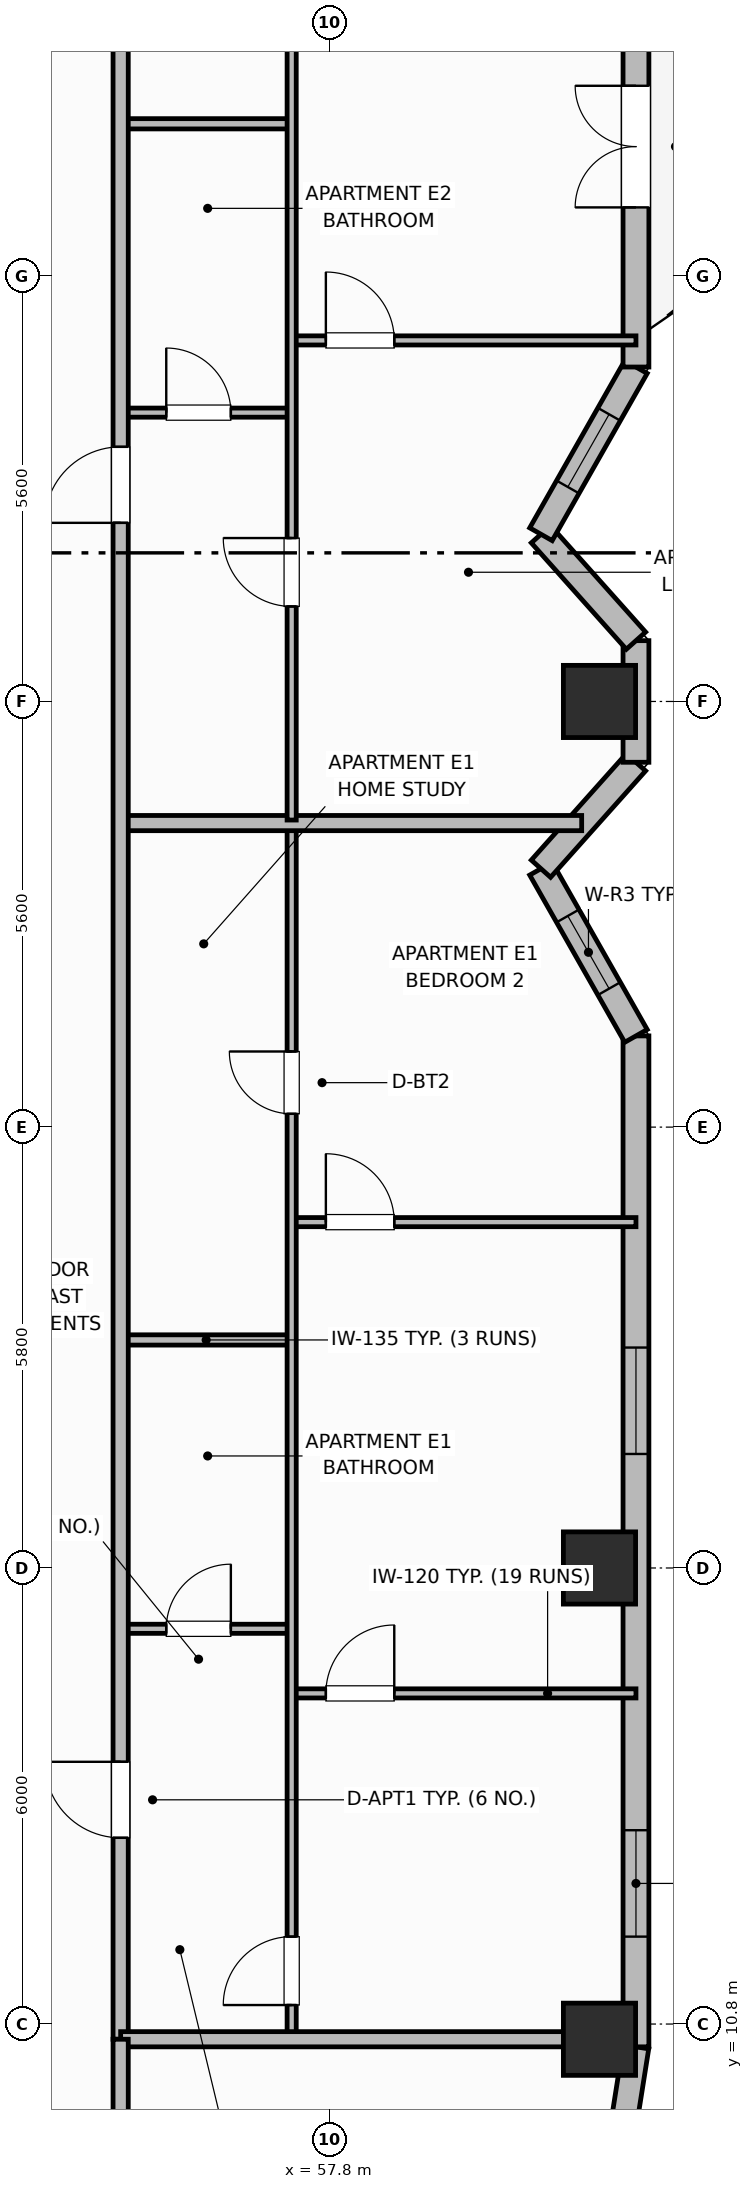
"""IFC4 building model, lengths in metres.
Left out: names, types, materials, properties, quantities, classifications, styles, units other than length and angle.
Written with IfcOpenShell. Run it as: python <this file> out.ifc"""

import sys

from ifc_helpers import new_model, si_unit, direction, frame, frame_2d, origin, origin_2d, place, context, subcontext, project, spatial, rectangle, extrude, element, fill, save


model = new_model("IFC4")
c1 = context("Model", 3, precision=1e-05, world=origin(), true_north=direction((0.0, 1.0)))
c2 = subcontext(c1, "Body", "Model", "MODEL_VIEW")
j1 = project(units=[si_unit("LENGTHUNIT", "METRE"), si_unit("PLANEANGLEUNIT", "RADIAN")], contexts=[c1])
p1 = place(None, origin())
s1 = spatial("IfcSite", under=j1, at=p1, CompositionType="ELEMENT")
p2 = place(p1, origin())
s2 = spatial("IfcBuilding", under=s1, at=p2, CompositionType="ELEMENT")
p3 = place(p2, frame((0.0, 0.0, 166.3)))
s3 = spatial("IfcBuildingStorey", under=s2, at=p3, CompositionType="ELEMENT", Elevation=166.3)
for number, where, z_axis, x_axis in (
    (1, (61.35, 10.6, 0.0), (0.0, 0.0, 1.0), (1.0, 0.0, 0.0)),
    (2, (61.35, 16.8, 0.0), (0.0, 0.0, 1.0), (1.0, 0.0, 0.0)),
    (3, (61.35, 28.2, 0.0), (0.0, 0.0, 1.0), (1.0, 0.0, 0.0)),
):
    element("IfcColumn", number, at=place(p3, frame(where, z_axis=z_axis, x_axis=x_axis)), inside=s3, PredefinedType="COLUMN", context=c2, shape_type="SweptSolid", body=[
        extrude(rectangle(XDim=0.95, YDim=0.95, at=origin_2d()), origin(), (0.0, 0.0, 1.0), 3.7),
    ])
p4 = place(p3, frame((61.652, 9.378, 0.0), z_axis=(0.0, 0.0, 1.0), x_axis=(0.156514556949, 0.987675651954, 0.0)))
e4 = element("IfcWall", 4, at=p4, inside=s3, PredefinedType="SOLIDWALL", context=c2, shape_type="SweptSolid", body=[
    extrude(rectangle(XDim=1.135, YDim=0.34, at=frame_2d((0.568, 0.0))), origin(), (0.0, 0.0, 1.0), 2.72),
])
p5 = place(p3, frame((61.83, 10.5, 0.0), z_axis=(0.0, 0.0, 1.0), x_axis=(0.0, 1.0, 0.0)))
e5 = element("IfcWall", 5, at=p5, inside=s3, PredefinedType="SOLIDWALL", context=c2, shape_type="SweptSolid", body=[
    extrude(rectangle(XDim=13.3, YDim=0.34, at=frame_2d((6.65, 0.0))), origin(), (0.0, 0.0, 1.0), 2.72),
])
p6 = place(p5, frame((1.45, 0.0, 0.75)))
e6 = element("IfcOpeningElement", 6, at=p6, cuts=e5, PredefinedType="OPENING", context=c2, shape_type="SweptSolid", body=[
    extrude(rectangle(XDim=1.4, YDim=1.85, at=frame_2d((0.7, 0.925))), frame((0.0, 0.18, 0.0), z_axis=(0.0, -1.0, 0.0), x_axis=(1.0, 0.0, 0.0)), (0.0, 0.0, 1.0), 0.36),
])
p7 = place(p5, frame((7.8, 0.0, 0.75)))
e7 = element("IfcOpeningElement", 7, at=p7, cuts=e5, PredefinedType="OPENING", context=c2, shape_type="SweptSolid", body=[
    extrude(rectangle(XDim=1.4, YDim=1.85, at=frame_2d((0.7, 0.925))), frame((0.0, 0.18, 0.0), z_axis=(0.0, -1.0, 0.0), x_axis=(1.0, 0.0, 0.0)), (0.0, 0.0, 1.0), 0.36),
])
p8 = place(p3, frame((61.83, 23.8, 0.0), z_axis=(0.0, 0.0, 1.0), x_axis=(-0.494017696272, 0.869451847873, 0.0)))
e8 = element("IfcWall", 8, at=p8, inside=s3, PredefinedType="SOLIDWALL", context=c2, shape_type="SweptSolid", body=[
    extrude(rectangle(XDim=2.53, YDim=0.34, at=frame_2d((1.265, 0.0))), origin(), (0.0, 0.0, 1.0), 2.72),
])
p9 = place(p8, frame((0.715, 0.0, 0.91)))
e9 = element("IfcOpeningElement", 9, at=p9, cuts=e8, PredefinedType="OPENING", context=c2, shape_type="SweptSolid", body=[
    extrude(rectangle(XDim=1.1, YDim=1.65, at=frame_2d((0.55, 0.825))), frame((0.0, 0.18, 0.0), z_axis=(0.0, -1.0, 0.0), x_axis=(1.0, 0.0, 0.0)), (0.0, 0.0, 1.0), 0.36),
])
p10 = place(p3, frame((60.58, 26.0, 0.0), z_axis=(0.0, 0.0, 1.0), x_axis=(0.666041619974, 0.74591457987, 0.0)))
e10 = element("IfcWall", 10, at=p10, inside=s3, PredefinedType="SOLIDWALL", context=c2, shape_type="SweptSolid", body=[
    extrude(rectangle(XDim=1.877, YDim=0.34, at=frame_2d((0.938, 0.0))), origin(), (0.0, 0.0, 1.0), 2.72),
])
p11 = place(p3, frame((61.83, 27.4, 0.0), z_axis=(0.0, 0.0, 1.0), x_axis=(0.0, 1.0, 0.0)))
e11 = element("IfcWall", 11, at=p11, inside=s3, PredefinedType="SOLIDWALL", context=c2, shape_type="SweptSolid", body=[
    extrude(rectangle(XDim=1.6, YDim=0.34, at=frame_2d((0.8, 0.0))), origin(), (0.0, 0.0, 1.0), 2.72),
])
p12 = place(p3, frame((61.83, 29.0, 0.0), z_axis=(0.0, 0.0, 1.0), x_axis=(-0.666041619974, 0.74591457987, 0.0)))
e12 = element("IfcWall", 12, at=p12, inside=s3, PredefinedType="SOLIDWALL", context=c2, shape_type="SweptSolid", body=[
    extrude(rectangle(XDim=1.877, YDim=0.34, at=frame_2d((0.938, 0.0))), origin(), (0.0, 0.0, 1.0), 2.72),
])
p13 = place(p3, frame((60.58, 30.4, 0.0), z_axis=(0.0, 0.0, 1.0), x_axis=(0.493976255291, 0.869475393101, 0.0)))
e13 = element("IfcWall", 13, at=p13, inside=s3, PredefinedType="SOLIDWALL", context=c2, shape_type="SweptSolid", body=[
    extrude(rectangle(XDim=2.531, YDim=0.34, at=frame_2d((1.265, 0.0))), origin(), (0.0, 0.0, 1.0), 2.72),
])
p14 = place(p13, frame((0.715, 0.0, 0.91)))
e14 = element("IfcOpeningElement", 14, at=p14, cuts=e13, PredefinedType="OPENING", context=c2, shape_type="SweptSolid", body=[
    extrude(rectangle(XDim=1.1, YDim=1.65, at=frame_2d((0.55, 0.825))), frame((0.0, 0.18, 0.0), z_axis=(0.0, -1.0, 0.0), x_axis=(1.0, 0.0, 0.0)), (0.0, 0.0, 1.0), 0.36),
])
p15 = place(p3, frame((61.83, 32.6, 0.0), z_axis=(0.0, 0.0, 1.0), x_axis=(0.0, 1.0, 0.0)))
e15 = element("IfcWall", 15, at=p15, inside=s3, PredefinedType="SOLIDWALL", context=c2, shape_type="SweptSolid", body=[
    extrude(rectangle(XDim=13.3, YDim=0.34, at=frame_2d((6.65, 0.0))), origin(), (0.0, 0.0, 1.0), 2.72),
])
p16 = place(p15, frame((2.1, 0.0, 0.0)))
e16 = element("IfcOpeningElement", 16, at=p16, cuts=e15, PredefinedType="OPENING", context=c2, shape_type="SweptSolid", body=[
    extrude(rectangle(XDim=1.6, YDim=2.1, at=frame_2d((0.8, 1.05))), frame((0.0, 0.18, 0.0), z_axis=(0.0, -1.0, 0.0), x_axis=(1.0, 0.0, 0.0)), (0.0, 0.0, 1.0), 0.36),
])
p17 = place(p15, frame((8.3, 0.0, 0.95)))
e17 = element("IfcOpeningElement", 17, at=p17, cuts=e15, PredefinedType="OPENING", context=c2, shape_type="SweptSolid", body=[
    extrude(rectangle(XDim=1.1, YDim=1.65, at=frame_2d((0.55, 0.825))), frame((0.0, 0.18, 0.0), z_axis=(0.0, -1.0, 0.0), x_axis=(1.0, 0.0, 0.0)), (0.0, 0.0, 1.0), 0.36),
])
p18 = place(p15, frame((10.6, 0.0, 0.95)))
e18 = element("IfcOpeningElement", 18, at=p18, cuts=e15, PredefinedType="OPENING", context=c2, shape_type="SweptSolid", body=[
    extrude(rectangle(XDim=1.1, YDim=1.65, at=frame_2d((0.55, 0.825))), frame((0.0, 0.18, 0.0), z_axis=(0.0, -1.0, 0.0), x_axis=(1.0, 0.0, 0.0)), (0.0, 0.0, 1.0), 0.36),
])
p19 = place(p3, frame((55.05, 16.0, 0.0), z_axis=(0.0, 0.0, 1.0), x_axis=(1.0, 0.0, 0.0)))
e19 = element("IfcWall", 19, at=p19, inside=s3, PredefinedType="PARTITIONING", context=c2, shape_type="SweptSolid", body=[
    extrude(rectangle(XDim=2.25, YDim=0.12, at=frame_2d((1.125, 0.0))), origin(), (0.0, 0.0, 1.0), 2.55),
])
p20 = place(p19, frame((0.6, 0.0, 0.0)))
e20 = element("IfcOpeningElement", 20, at=p20, cuts=e19, PredefinedType="OPENING", context=c2, shape_type="SweptSolid", body=[
    extrude(rectangle(XDim=0.85, YDim=2.1, at=frame_2d((0.425, 1.05))), frame((0.0, 0.07, 0.0), z_axis=(0.0, -1.0, 0.0), x_axis=(1.0, 0.0, 0.0)), (0.0, 0.0, 1.0), 0.14),
])
p21 = place(p3, frame((55.05, 19.8, 0.0), z_axis=(0.0, 0.0, 1.0), x_axis=(1.0, 0.0, 0.0)))
e21 = element("IfcWall", 21, at=p21, inside=s3, PredefinedType="PARTITIONING", context=c2, shape_type="SweptSolid", body=[
    extrude(rectangle(XDim=2.25, YDim=0.135, at=frame_2d((1.125, 0.0))), origin(), (0.0, 0.0, 1.0), 2.55),
])
p22 = place(p3, frame((57.3, 15.15, 0.0), z_axis=(0.0, 0.0, 1.0), x_axis=(1.0, 0.0, 0.0)))
e22 = element("IfcWall", 22, at=p22, inside=s3, PredefinedType="PARTITIONING", context=c2, shape_type="SweptSolid", body=[
    extrude(rectangle(XDim=4.53, YDim=0.12, at=frame_2d((2.265, 0.0))), origin(), (0.0, 0.0, 1.0), 2.55),
])
p23 = place(p22, frame((0.45, 0.0, 0.0)))
e23 = element("IfcOpeningElement", 23, at=p23, cuts=e22, PredefinedType="OPENING", context=c2, shape_type="SweptSolid", body=[
    extrude(rectangle(XDim=0.9, YDim=2.1, at=frame_2d((0.45, 1.05))), frame((0.0, 0.07, 0.0), z_axis=(0.0, -1.0, 0.0), x_axis=(1.0, 0.0, 0.0)), (0.0, 0.0, 1.0), 0.14),
])
p24 = place(p3, frame((57.3, 21.35, 0.0), z_axis=(0.0, 0.0, 1.0), x_axis=(1.0, 0.0, 0.0)))
e24 = element("IfcWall", 24, at=p24, inside=s3, PredefinedType="PARTITIONING", context=c2, shape_type="SweptSolid", body=[
    extrude(rectangle(XDim=4.53, YDim=0.12, at=frame_2d((2.265, 0.0))), origin(), (0.0, 0.0, 1.0), 2.55),
])
p25 = place(p24, frame((0.45, 0.0, 0.0)))
e25 = element("IfcOpeningElement", 25, at=p25, cuts=e24, PredefinedType="OPENING", context=c2, shape_type="SweptSolid", body=[
    extrude(rectangle(XDim=0.9, YDim=2.1, at=frame_2d((0.45, 1.05))), frame((0.0, 0.07, 0.0), z_axis=(0.0, -1.0, 0.0), x_axis=(1.0, 0.0, 0.0)), (0.0, 0.0, 1.0), 0.14),
])
p26 = place(p3, frame((57.3, 10.64, 0.0), z_axis=(0.0, 0.0, 1.0), x_axis=(0.0, 1.0, 0.0)))
e26 = element("IfcWall", 26, at=p26, inside=s3, PredefinedType="PARTITIONING", context=c2, shape_type="SweptSolid", body=[
    extrude(rectangle(XDim=15.92, YDim=0.12, at=frame_2d((7.96, 0.0))), origin(), (0.0, 0.0, 1.0), 2.55),
])
p27 = place(p26, frame((0.41, 0.0, 0.0)))
e27 = element("IfcOpeningElement", 27, at=p27, cuts=e26, PredefinedType="OPENING", context=c2, shape_type="SweptSolid", body=[
    extrude(rectangle(XDim=0.9, YDim=2.1, at=frame_2d((0.45, 1.05))), frame((0.0, 0.07, 0.0), z_axis=(0.0, -1.0, 0.0), x_axis=(1.0, 0.0, 0.0)), (0.0, 0.0, 1.0), 0.14),
])
p28 = place(p26, frame((12.135, 0.0, 0.0)))
e28 = element("IfcOpeningElement", 28, at=p28, cuts=e26, PredefinedType="OPENING", context=c2, shape_type="SweptSolid", body=[
    extrude(rectangle(XDim=0.82, YDim=2.08, at=frame_2d((0.41, 1.04))), frame((0.0, 0.07, 0.0), z_axis=(0.0, -1.0, 0.0), x_axis=(1.0, 0.0, 0.0)), (0.0, 0.0, 1.0), 0.14),
])
p29 = place(p3, frame((55.05, 26.6, 0.0), z_axis=(0.0, 0.0, 1.0), x_axis=(1.0, 0.0, 0.0)))
e29 = element("IfcWall", 29, at=p29, inside=s3, PredefinedType="PARTITIONING", context=c2, shape_type="SweptSolid", body=[
    extrude(rectangle(XDim=6.066, YDim=0.2, at=frame_2d((3.033, 0.0))), origin(), (0.0, 0.0, 1.0), 2.55),
])
p30 = place(p3, frame((55.05, 32.0, 0.0), z_axis=(0.0, 0.0, 1.0), x_axis=(1.0, 0.0, 0.0)))
e30 = element("IfcWall", 30, at=p30, inside=s3, PredefinedType="PARTITIONING", context=c2, shape_type="SweptSolid", body=[
    extrude(rectangle(XDim=2.25, YDim=0.12, at=frame_2d((1.125, 0.0))), origin(), (0.0, 0.0, 1.0), 2.55),
])
p31 = place(p30, frame((0.6, 0.0, 0.0)))
e31 = element("IfcOpeningElement", 31, at=p31, cuts=e30, PredefinedType="OPENING", context=c2, shape_type="SweptSolid", body=[
    extrude(rectangle(XDim=0.85, YDim=2.1, at=frame_2d((0.425, 1.05))), frame((0.0, 0.07, 0.0), z_axis=(0.0, -1.0, 0.0), x_axis=(1.0, 0.0, 0.0)), (0.0, 0.0, 1.0), 0.14),
])
p32 = place(p3, frame((55.05, 35.8, 0.0), z_axis=(0.0, 0.0, 1.0), x_axis=(1.0, 0.0, 0.0)))
e32 = element("IfcWall", 32, at=p32, inside=s3, PredefinedType="PARTITIONING", context=c2, shape_type="SweptSolid", body=[
    extrude(rectangle(XDim=2.25, YDim=0.135, at=frame_2d((1.125, 0.0))), origin(), (0.0, 0.0, 1.0), 2.55),
])
p33 = place(p3, frame((57.3, 32.95, 0.0), z_axis=(0.0, 0.0, 1.0), x_axis=(1.0, 0.0, 0.0)))
e33 = element("IfcWall", 33, at=p33, inside=s3, PredefinedType="PARTITIONING", context=c2, shape_type="SweptSolid", body=[
    extrude(rectangle(XDim=4.53, YDim=0.12, at=frame_2d((2.265, 0.0))), origin(), (0.0, 0.0, 1.0), 2.55),
])
p34 = place(p33, frame((0.45, 0.0, 0.0)))
e34 = element("IfcOpeningElement", 34, at=p34, cuts=e33, PredefinedType="OPENING", context=c2, shape_type="SweptSolid", body=[
    extrude(rectangle(XDim=0.9, YDim=2.1, at=frame_2d((0.45, 1.05))), frame((0.0, 0.07, 0.0), z_axis=(0.0, -1.0, 0.0), x_axis=(1.0, 0.0, 0.0)), (0.0, 0.0, 1.0), 0.14),
])
p35 = place(p3, frame((57.3, 26.64, 0.0), z_axis=(0.0, 0.0, 1.0), x_axis=(0.0, 1.0, 0.0)))
e35 = element("IfcWall", 35, at=p35, inside=s3, PredefinedType="PARTITIONING", context=c2, shape_type="SweptSolid", body=[
    extrude(rectangle(XDim=19.12, YDim=0.12, at=frame_2d((9.56, 0.0))), origin(), (0.0, 0.0, 1.0), 2.55),
])
p36 = place(p35, frame((2.81, 0.0, 0.0)))
e36 = element("IfcOpeningElement", 36, at=p36, cuts=e35, PredefinedType="OPENING", context=c2, shape_type="SweptSolid", body=[
    extrude(rectangle(XDim=0.9, YDim=2.1, at=frame_2d((0.45, 1.05))), frame((0.0, 0.07, 0.0), z_axis=(0.0, -1.0, 0.0), x_axis=(1.0, 0.0, 0.0)), (0.0, 0.0, 1.0), 0.14),
])
p37 = place(p35, frame((15.365, 0.0, 0.0)))
e37 = element("IfcOpeningElement", 37, at=p37, cuts=e35, PredefinedType="OPENING", context=c2, shape_type="SweptSolid", body=[
    extrude(rectangle(XDim=0.82, YDim=2.08, at=frame_2d((0.41, 1.04))), frame((0.0, 0.07, 0.0), z_axis=(0.0, -1.0, 0.0), x_axis=(1.0, 0.0, 0.0)), (0.0, 0.0, 1.0), 0.14),
])
p38 = place(p3, frame((55.05, 10.6, 0.0), z_axis=(0.0, 0.0, 1.0), x_axis=(0.0, 1.0, 0.0)))
e38 = element("IfcWall", 38, at=p38, inside=s3, PredefinedType="PARTITIONING", context=c2, shape_type="SweptSolid", body=[
    extrude(rectangle(XDim=35.2, YDim=0.2, at=frame_2d((17.6, 0.0))), origin(), (0.0, 0.0, 1.0), 2.55),
])
p39 = place(p38, frame((2.65, 0.0, 0.0)))
e39 = element("IfcOpeningElement", 39, at=p39, cuts=e38, PredefinedType="OPENING", context=c2, shape_type="SweptSolid", body=[
    extrude(rectangle(XDim=1.0, YDim=2.15, at=frame_2d((0.5, 1.075))), frame((0.0, 0.11, 0.0), z_axis=(0.0, -1.0, 0.0), x_axis=(1.0, 0.0, 0.0)), (0.0, 0.0, 1.0), 0.22),
])
p40 = place(p38, frame((19.95, 0.0, 0.0)))
e40 = element("IfcOpeningElement", 40, at=p40, cuts=e38, PredefinedType="OPENING", context=c2, shape_type="SweptSolid", body=[
    extrude(rectangle(XDim=1.0, YDim=2.15, at=frame_2d((0.5, 1.075))), frame((0.0, 0.11, 0.0), z_axis=(0.0, -1.0, 0.0), x_axis=(1.0, 0.0, 0.0)), (0.0, 0.0, 1.0), 0.22),
])
p41 = place(p3, frame((55.05, 10.6, 0.0), z_axis=(0.0, 0.0, 1.0), x_axis=(1.0, 0.0, 0.0)))
e41 = element("IfcWall", 41, at=p41, inside=s3, PredefinedType="PARTITIONING", context=c2, shape_type="SweptSolid", body=[
    extrude(rectangle(XDim=6.36, YDim=0.2, at=frame_2d((3.18, 0.0))), origin(), (0.0, 0.0, 1.0), 2.55),
])
p42 = place(p3, frame((55.05, 6.87, 0.0), z_axis=(0.0, 0.0, 1.0), x_axis=(0.0, 1.0, 0.0)))
e42 = element("IfcWall", 42, at=p42, inside=s3, PredefinedType="PARTITIONING", context=c2, shape_type="SweptSolid", body=[
    extrude(rectangle(XDim=3.73, YDim=0.2, at=frame_2d((1.865, 0.0))), origin(), (0.0, 0.0, 1.0), 2.55),
])
p43 = place(p6, origin())
e43 = element("IfcWindow", 43, at=p43, inside=s3, PartitioningType="SINGLE_PANEL", PredefinedType="WINDOW", context=c2, shape_type="SweptSolid", body=[
    extrude(rectangle(XDim=1.4, YDim=1.85, at=frame_2d((0.7, 0.925))), frame((0.0, 0.03, 0.0), z_axis=(0.0, -1.0, 0.0), x_axis=(1.0, 0.0, 0.0)), (0.0, 0.0, 1.0), 0.06),
])
fill(e6, e43)
p44 = place(p7, origin())
e44 = element("IfcWindow", 44, at=p44, inside=s3, PartitioningType="SINGLE_PANEL", PredefinedType="WINDOW", context=c2, shape_type="SweptSolid", body=[
    extrude(rectangle(XDim=1.4, YDim=1.85, at=frame_2d((0.7, 0.925))), frame((0.0, 0.03, 0.0), z_axis=(0.0, -1.0, 0.0), x_axis=(1.0, 0.0, 0.0)), (0.0, 0.0, 1.0), 0.06),
])
fill(e7, e44)
p45 = place(p9, origin())
e45 = element("IfcWindow", 45, at=p45, inside=s3, PartitioningType="SINGLE_PANEL", PredefinedType="WINDOW", context=c2, shape_type="SweptSolid", body=[
    extrude(rectangle(XDim=1.1, YDim=1.65, at=frame_2d((0.55, 0.825))), frame((0.0, 0.03, 0.0), z_axis=(0.0, -1.0, 0.0), x_axis=(1.0, 0.0, 0.0)), (0.0, 0.0, 1.0), 0.06),
])
fill(e9, e45)
p46 = place(p14, origin())
e46 = element("IfcWindow", 46, at=p46, inside=s3, PartitioningType="SINGLE_PANEL", PredefinedType="WINDOW", context=c2, shape_type="SweptSolid", body=[
    extrude(rectangle(XDim=1.1, YDim=1.65, at=frame_2d((0.55, 0.825))), frame((0.0, 0.03, 0.0), z_axis=(0.0, -1.0, 0.0), x_axis=(1.0, 0.0, 0.0)), (0.0, 0.0, 1.0), 0.06),
])
fill(e14, e46)
p47 = place(p16, origin())
e47 = element("IfcDoor", 47, at=p47, inside=s3, OperationType="DOUBLE_DOOR_SINGLE_SWING", PredefinedType="DOOR", context=c2, shape_type="SweptSolid", body=[
    extrude(rectangle(XDim=1.6, YDim=2.1, at=frame_2d((0.8, 1.05))), frame((0.0, 0.025, 0.0), z_axis=(0.0, -1.0, 0.0), x_axis=(1.0, 0.0, 0.0)), (0.0, 0.0, 1.0), 0.05),
])
fill(e16, e47)
p48 = place(p20, origin())
e48 = element("IfcDoor", 48, at=p48, inside=s3, OperationType="SINGLE_SWING_RIGHT", PredefinedType="DOOR", context=c2, shape_type="SweptSolid", body=[
    extrude(rectangle(XDim=0.85, YDim=2.1, at=frame_2d((0.425, 1.05))), frame((0.0, 0.025, 0.0), z_axis=(0.0, -1.0, 0.0), x_axis=(1.0, 0.0, 0.0)), (0.0, 0.0, 1.0), 0.05),
])
fill(e20, e48)
p49 = place(p23, origin())
e49 = element("IfcDoor", 49, at=p49, inside=s3, OperationType="SINGLE_SWING_RIGHT", PredefinedType="DOOR", context=c2, shape_type="SweptSolid", body=[
    extrude(rectangle(XDim=0.9, YDim=2.1, at=frame_2d((0.45, 1.05))), frame((0.0, 0.025, 0.0), z_axis=(0.0, -1.0, 0.0), x_axis=(1.0, 0.0, 0.0)), (0.0, 0.0, 1.0), 0.05),
])
fill(e23, e49)
p50 = place(p25, origin())
e50 = element("IfcDoor", 50, at=p50, inside=s3, OperationType="SINGLE_SWING_LEFT", PredefinedType="DOOR", context=c2, shape_type="SweptSolid", body=[
    extrude(rectangle(XDim=0.9, YDim=2.1, at=frame_2d((0.45, 1.05))), frame((0.0, 0.025, 0.0), z_axis=(0.0, -1.0, 0.0), x_axis=(1.0, 0.0, 0.0)), (0.0, 0.0, 1.0), 0.05),
])
fill(e25, e50)
p51 = place(p27, origin())
e51 = element("IfcDoor", 51, at=p51, inside=s3, OperationType="SINGLE_SWING_LEFT", PredefinedType="DOOR", context=c2, shape_type="SweptSolid", body=[
    extrude(rectangle(XDim=0.9, YDim=2.1, at=frame_2d((0.45, 1.05))), frame((0.0, 0.025, 0.0), z_axis=(0.0, -1.0, 0.0), x_axis=(1.0, 0.0, 0.0)), (0.0, 0.0, 1.0), 0.05),
])
fill(e27, e51)
p52 = place(p28, origin())
e52 = element("IfcDoor", 52, at=p52, inside=s3, OperationType="SINGLE_SWING_RIGHT", PredefinedType="DOOR", context=c2, shape_type="SweptSolid", body=[
    extrude(rectangle(XDim=0.82, YDim=2.08, at=frame_2d((0.41, 1.04))), frame((0.0, 0.025, 0.0), z_axis=(0.0, -1.0, 0.0), x_axis=(1.0, 0.0, 0.0)), (0.0, 0.0, 1.0), 0.05),
])
fill(e28, e52)
p53 = place(p31, origin())
e53 = element("IfcDoor", 53, at=p53, inside=s3, OperationType="SINGLE_SWING_LEFT", PredefinedType="DOOR", context=c2, shape_type="SweptSolid", body=[
    extrude(rectangle(XDim=0.85, YDim=2.1, at=frame_2d((0.425, 1.05))), frame((0.0, 0.025, 0.0), z_axis=(0.0, -1.0, 0.0), x_axis=(1.0, 0.0, 0.0)), (0.0, 0.0, 1.0), 0.05),
])
fill(e31, e53)
p54 = place(p34, origin())
e54 = element("IfcDoor", 54, at=p54, inside=s3, OperationType="SINGLE_SWING_LEFT", PredefinedType="DOOR", context=c2, shape_type="SweptSolid", body=[
    extrude(rectangle(XDim=0.9, YDim=2.1, at=frame_2d((0.45, 1.05))), frame((0.0, 0.025, 0.0), z_axis=(0.0, -1.0, 0.0), x_axis=(1.0, 0.0, 0.0)), (0.0, 0.0, 1.0), 0.05),
])
fill(e34, e54)
p55 = place(p36, origin())
e55 = element("IfcDoor", 55, at=p55, inside=s3, OperationType="SINGLE_SWING_RIGHT", PredefinedType="DOOR", context=c2, shape_type="SweptSolid", body=[
    extrude(rectangle(XDim=0.9, YDim=2.1, at=frame_2d((0.45, 1.05))), frame((0.0, 0.025, 0.0), z_axis=(0.0, -1.0, 0.0), x_axis=(1.0, 0.0, 0.0)), (0.0, 0.0, 1.0), 0.05),
])
fill(e36, e55)
p56 = place(p39, origin())
e56 = element("IfcDoor", 56, at=p56, inside=s3, OperationType="SINGLE_SWING_RIGHT", PredefinedType="DOOR", context=c2, shape_type="SweptSolid", body=[
    extrude(rectangle(XDim=1.0, YDim=2.15, at=frame_2d((0.5, 1.075))), frame((0.0, 0.025, 0.0), z_axis=(0.0, -1.0, 0.0), x_axis=(1.0, 0.0, 0.0)), (0.0, 0.0, 1.0), 0.05),
])
fill(e39, e56)
p57 = place(p40, origin())
e57 = element("IfcDoor", 57, at=p57, inside=s3, OperationType="SINGLE_SWING_LEFT", PredefinedType="DOOR", context=c2, shape_type="SweptSolid", body=[
    extrude(rectangle(XDim=1.0, YDim=2.15, at=frame_2d((0.5, 1.075))), frame((0.0, 0.025, 0.0), z_axis=(0.0, -1.0, 0.0), x_axis=(1.0, 0.0, 0.0)), (0.0, 0.0, 1.0), 0.05),
])
fill(e40, e57)
save(model, sys.argv[1])
